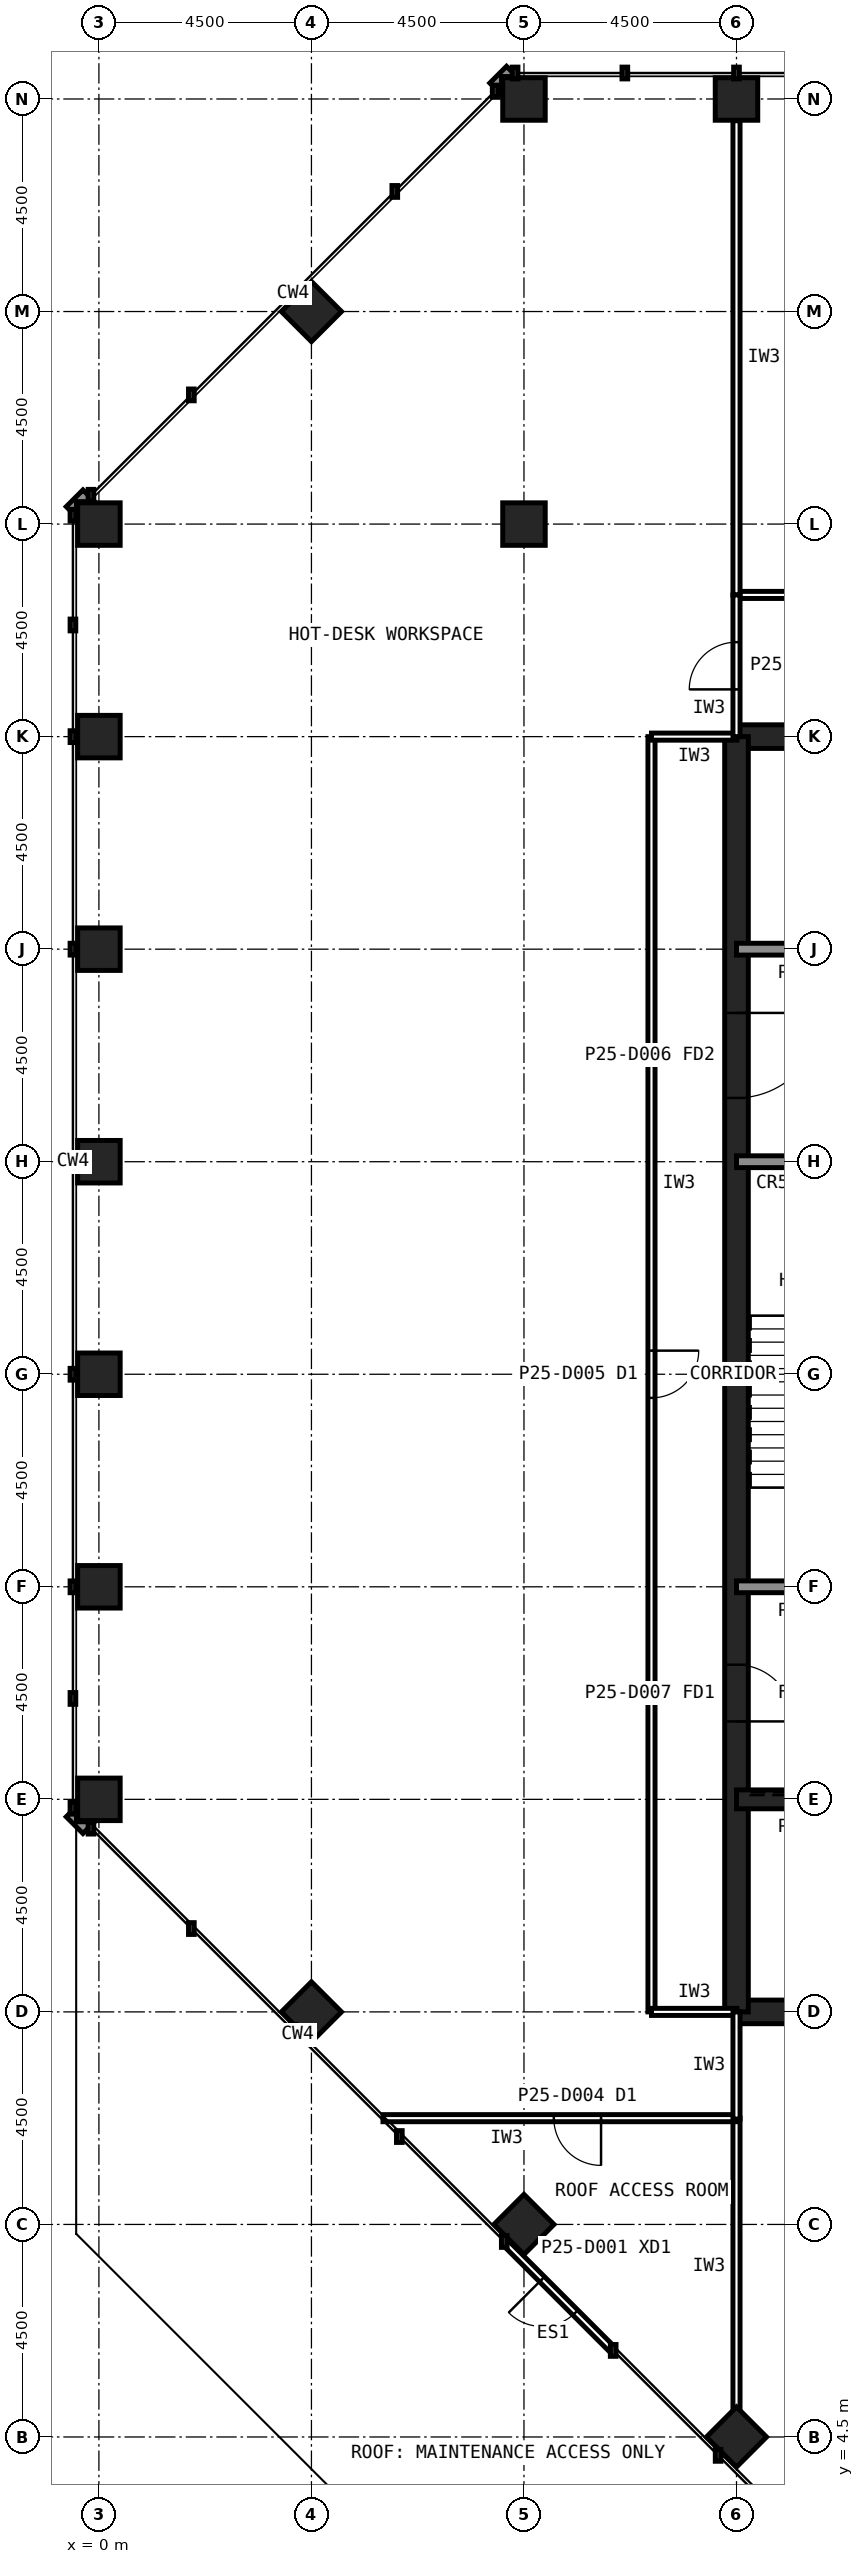
"""IFC4 building model, lengths in metres.
Left out: names, types, materials, properties, quantities, classifications, styles, units other than length and angle.
Written with IfcOpenShell. Run it as: python <this file> out.ifc"""

import sys

from ifc_helpers import new_model, si_unit, direction, frame, frame_2d, origin, origin_2d, place, context, subcontext, project, spatial, rectangle, hollow_rectangle, extrude, element, fill, save


model = new_model("IFC4")
c1 = context("Model", 3, precision=1e-05, world=origin(), true_north=direction((0.0, 1.0)))
c2 = subcontext(c1, "Body", "Model", "MODEL_VIEW")
j1 = project(units=[si_unit("LENGTHUNIT", "METRE"), si_unit("PLANEANGLEUNIT", "RADIAN")], contexts=[c1])
p1 = place(None, origin())
s1 = spatial("IfcSite", under=j1, at=p1, CompositionType="ELEMENT")
p2 = place(p1, origin())
s2 = spatial("IfcBuilding", under=s1, at=p2, CompositionType="ELEMENT")
p3 = place(p2, frame((0.0, 0.0, 110.6)))
s3 = spatial("IfcBuildingStorey", under=s2, at=p3, CompositionType="ELEMENT", Elevation=110.6)
for number, where, z_axis, x_axis in (
    (1, (13.5, 54.0, 0.0), (0.0, 0.0, 1.0), (1.0, 0.0, 0.0)),
    (2, (9.0, 54.0, 0.0), (0.0, 0.0, 1.0), (1.0, 0.0, 0.0)),
    (3, (0.0, 45.0, 0.0), (0.0, 0.0, 1.0), (1.0, 0.0, 0.0)),
    (4, (0.0, 40.5, 0.0), (0.0, 0.0, 1.0), (1.0, 0.0, 0.0)),
    (5, (0.0, 36.0, 0.0), (0.0, 0.0, 1.0), (1.0, 0.0, 0.0)),
    (6, (0.0, 31.5, 0.0), (0.0, 0.0, 1.0), (1.0, 0.0, 0.0)),
    (7, (0.0, 27.0, 0.0), (0.0, 0.0, 1.0), (1.0, 0.0, 0.0)),
    (8, (0.0, 22.5, 0.0), (0.0, 0.0, 1.0), (1.0, 0.0, 0.0)),
    (9, (0.0, 18.0, 0.0), (0.0, 0.0, 1.0), (1.0, 0.0, 0.0)),
    (10, (13.5, 4.5, 0.0), (0.0, 0.0, 1.0), (0.707, 0.707, 0.0)),
    (11, (9.0, 9.0, 0.0), (0.0, 0.0, 1.0), (0.707, 0.707, 0.0)),
    (12, (4.5, 13.5, 0.0), (0.0, 0.0, 1.0), (0.707, 0.707, 0.0)),
    (13, (4.5, 49.5, 0.0), (0.0, 0.0, 1.0), (0.707, 0.707, 0.0)),
    (14, (9.0, 45.0, 0.0), (0.0, 0.0, 1.0), (1.0, 0.0, 0.0)),
):
    element("IfcColumn", number, at=place(p3, frame(where, z_axis=z_axis, x_axis=x_axis)), inside=s3, PredefinedType="COLUMN", context=c2, shape_type="SweptSolid", body=[
        extrude(hollow_rectangle(XDim=0.9, YDim=0.9, WallThickness=0.063, at=origin_2d()), origin(), (0.0, 0.0, 1.0), 5.0),
    ])
for number, where, z_axis, x_axis in (
    (15, (13.5, 13.5, 0.0), (0.0, 0.0, 1.0), (1.0, 0.0, 0.0)),
    (16, (40.5, 40.5, 0.0), (0.0, 0.0, 1.0), (-1.0, 0.0, 0.0)),
):
    element("IfcWall", number, at=place(p3, frame(where, z_axis=z_axis, x_axis=x_axis)), inside=s3, PredefinedType="SHEAR", context=c2, shape_type="SweptSolid", body=[
        extrude(rectangle(XDim=27.0, YDim=0.5, at=frame_2d((13.5, 0.0))), origin(), (0.0, 0.0, 1.0), 5.0),
    ])
p4 = place(p3, frame((13.5, 40.5, 0.0), z_axis=(0.0, 0.0, 1.0), x_axis=(0.0, -1.0, 0.0)))
e17 = element("IfcWall", 17, at=p4, inside=s3, PredefinedType="SHEAR", context=c2, shape_type="SweptSolid", body=[
    extrude(rectangle(XDim=27.0, YDim=0.5, at=frame_2d((13.5, 0.0))), origin(), (0.0, 0.0, 1.0), 5.0),
])
p5 = place(p4, frame((19.65, 0.0, 0.0)))
e18 = element("IfcOpeningElement", 18, at=p5, cuts=e17, PredefinedType="OPENING", context=c2, shape_type="SweptSolid", body=[
    extrude(rectangle(XDim=1.2, YDim=2.1, at=frame_2d((0.6, 1.05))), frame((0.0, 0.26, 0.0), z_axis=(0.0, -1.0, 0.0), x_axis=(1.0, 0.0, 0.0)), (0.0, 0.0, 1.0), 0.52),
])
p6 = place(p4, frame((5.85, 0.0, 0.0)))
e19 = element("IfcOpeningElement", 19, at=p6, cuts=e17, PredefinedType="OPENING", context=c2, shape_type="SweptSolid", body=[
    extrude(rectangle(XDim=1.8, YDim=2.1, at=frame_2d((0.9, 1.05))), frame((0.0, 0.26, 0.0), z_axis=(0.0, -1.0, 0.0), x_axis=(1.0, 0.0, 0.0)), (0.0, 0.0, 1.0), 0.52),
])
p7 = place(p3, frame((13.5, 18.0, 0.0), z_axis=(0.0, 0.0, 1.0), x_axis=(1.0, 0.0, 0.0)))
e20 = element("IfcWall", 20, at=p7, inside=s3, PredefinedType="SHEAR", context=c2, shape_type="SweptSolid", body=[
    extrude(rectangle(XDim=27.0, YDim=0.4, at=frame_2d((13.5, 0.0))), origin(), (0.0, 0.0, 1.0), 5.0),
])
p8 = place(p7, frame((24.3, 0.0, 0.0)))
e21 = element("IfcOpeningElement", 21, at=p8, cuts=e20, PredefinedType="OPENING", context=c2, shape_type="SweptSolid", body=[
    extrude(rectangle(XDim=0.9, YDim=2.1, at=frame_2d((0.45, 1.05))), frame((0.0, 0.21, 0.0), z_axis=(0.0, -1.0, 0.0), x_axis=(1.0, 0.0, 0.0)), (0.0, 0.0, 1.0), 0.42),
])
p9 = place(p7, frame((5.45, 0.0, 0.0)))
e22 = element("IfcOpeningElement", 22, at=p9, cuts=e20, PredefinedType="OPENING", context=c2, shape_type="SweptSolid", body=[
    extrude(rectangle(XDim=1.1, YDim=2.1, at=frame_2d((0.55, 1.05))), frame((0.0, 0.21, 0.0), z_axis=(0.0, -1.0, 0.0), x_axis=(1.0, 0.0, 0.0)), (0.0, 0.0, 1.0), 0.42),
])
p10 = place(p7, frame((8.45, 0.0, 0.0)))
e23 = element("IfcOpeningElement", 23, at=p10, cuts=e20, PredefinedType="OPENING", context=c2, shape_type="SweptSolid", body=[
    extrude(rectangle(XDim=1.1, YDim=2.1, at=frame_2d((0.55, 1.05))), frame((0.0, 0.21, 0.0), z_axis=(0.0, -1.0, 0.0), x_axis=(1.0, 0.0, 0.0)), (0.0, 0.0, 1.0), 0.42),
])
p11 = place(p7, frame((11.45, 0.0, 0.0)))
e24 = element("IfcOpeningElement", 24, at=p11, cuts=e20, PredefinedType="OPENING", context=c2, shape_type="SweptSolid", body=[
    extrude(rectangle(XDim=1.1, YDim=2.1, at=frame_2d((0.55, 1.05))), frame((0.0, 0.21, 0.0), z_axis=(0.0, -1.0, 0.0), x_axis=(1.0, 0.0, 0.0)), (0.0, 0.0, 1.0), 0.42),
])
p12 = place(p7, frame((14.45, 0.0, 0.0)))
e25 = element("IfcOpeningElement", 25, at=p12, cuts=e20, PredefinedType="OPENING", context=c2, shape_type="SweptSolid", body=[
    extrude(rectangle(XDim=1.1, YDim=2.1, at=frame_2d((0.55, 1.05))), frame((0.0, 0.21, 0.0), z_axis=(0.0, -1.0, 0.0), x_axis=(1.0, 0.0, 0.0)), (0.0, 0.0, 1.0), 0.42),
])
p13 = place(p7, frame((17.45, 0.0, 0.0)))
e26 = element("IfcOpeningElement", 26, at=p13, cuts=e20, PredefinedType="OPENING", context=c2, shape_type="SweptSolid", body=[
    extrude(rectangle(XDim=1.1, YDim=2.1, at=frame_2d((0.55, 1.05))), frame((0.0, 0.21, 0.0), z_axis=(0.0, -1.0, 0.0), x_axis=(1.0, 0.0, 0.0)), (0.0, 0.0, 1.0), 0.42),
])
p14 = place(p7, frame((20.45, 0.0, 0.0)))
e27 = element("IfcOpeningElement", 27, at=p14, cuts=e20, PredefinedType="OPENING", context=c2, shape_type="SweptSolid", body=[
    extrude(rectangle(XDim=1.1, YDim=2.1, at=frame_2d((0.55, 1.05))), frame((0.0, 0.21, 0.0), z_axis=(0.0, -1.0, 0.0), x_axis=(1.0, 0.0, 0.0)), (0.0, 0.0, 1.0), 0.42),
])
p15 = place(p7, frame((1.6, 0.0, 0.0)))
e28 = element("IfcOpeningElement", 28, at=p15, cuts=e20, PredefinedType="OPENING", context=c2, shape_type="SweptSolid", body=[
    extrude(rectangle(XDim=1.3, YDim=2.2, at=frame_2d((0.65, 1.1))), frame((0.0, 0.21, 0.0), z_axis=(0.0, -1.0, 0.0), x_axis=(1.0, 0.0, 0.0)), (0.0, 0.0, 1.0), 0.42),
])
p16 = place(p3, frame((13.5, 36.0, 0.0), z_axis=(0.0, 0.0, 1.0), x_axis=(1.0, 0.0, 0.0)))
e29 = element("IfcWall", 29, at=p16, inside=s3, PredefinedType="SOLIDWALL", context=c2, shape_type="SweptSolid", body=[
    extrude(rectangle(XDim=27.0, YDim=0.25, at=frame_2d((13.5, 0.0))), origin(), (0.0, 0.0, 1.0), 4.84),
])
p17 = place(p16, frame((1.8, 0.0, 0.0)))
e30 = element("IfcOpeningElement", 30, at=p17, cuts=e29, PredefinedType="OPENING", context=c2, shape_type="SweptSolid", body=[
    extrude(rectangle(XDim=0.9, YDim=2.1, at=frame_2d((0.45, 1.05))), frame((0.0, 0.135, 0.0), z_axis=(0.0, -1.0, 0.0), x_axis=(1.0, 0.0, 0.0)), (0.0, 0.0, 1.0), 0.27),
])
p18 = place(p16, frame((5.35, 0.0, 0.0)))
e31 = element("IfcOpeningElement", 31, at=p18, cuts=e29, PredefinedType="OPENING", context=c2, shape_type="SweptSolid", body=[
    extrude(rectangle(XDim=1.3, YDim=2.2, at=frame_2d((0.65, 1.1))), frame((0.0, 0.135, 0.0), z_axis=(0.0, -1.0, 0.0), x_axis=(1.0, 0.0, 0.0)), (0.0, 0.0, 1.0), 0.27),
])
p19 = place(p16, frame((8.35, 0.0, 0.0)))
e32 = element("IfcOpeningElement", 32, at=p19, cuts=e29, PredefinedType="OPENING", context=c2, shape_type="SweptSolid", body=[
    extrude(rectangle(XDim=1.3, YDim=2.2, at=frame_2d((0.65, 1.1))), frame((0.0, 0.135, 0.0), z_axis=(0.0, -1.0, 0.0), x_axis=(1.0, 0.0, 0.0)), (0.0, 0.0, 1.0), 0.27),
])
p20 = place(p16, frame((11.35, 0.0, 0.0)))
e33 = element("IfcOpeningElement", 33, at=p20, cuts=e29, PredefinedType="OPENING", context=c2, shape_type="SweptSolid", body=[
    extrude(rectangle(XDim=1.3, YDim=2.2, at=frame_2d((0.65, 1.1))), frame((0.0, 0.135, 0.0), z_axis=(0.0, -1.0, 0.0), x_axis=(1.0, 0.0, 0.0)), (0.0, 0.0, 1.0), 0.27),
])
p21 = place(p16, frame((24.1, 0.0, 0.0)))
e34 = element("IfcOpeningElement", 34, at=p21, cuts=e29, PredefinedType="OPENING", context=c2, shape_type="SweptSolid", body=[
    extrude(rectangle(XDim=1.3, YDim=2.2, at=frame_2d((0.65, 1.1))), frame((0.0, 0.135, 0.0), z_axis=(0.0, -1.0, 0.0), x_axis=(1.0, 0.0, 0.0)), (0.0, 0.0, 1.0), 0.27),
])
p22 = place(p3, frame((13.5, 22.5, 0.0), z_axis=(0.0, 0.0, 1.0), x_axis=(1.0, 0.0, 0.0)))
e35 = element("IfcWall", 35, at=p22, inside=s3, PredefinedType="SOLIDWALL", context=c2, shape_type="SweptSolid", body=[
    extrude(rectangle(XDim=27.0, YDim=0.25, at=frame_2d((13.5, 0.0))), origin(), (0.0, 0.0, 1.0), 4.84),
])
p23 = place(p22, frame((1.65, 0.0, 0.0)))
e36 = element("IfcOpeningElement", 36, at=p23, cuts=e35, PredefinedType="OPENING", context=c2, shape_type="SweptSolid", body=[
    extrude(rectangle(XDim=1.2, YDim=2.1, at=frame_2d((0.6, 1.05))), frame((0.0, 0.135, 0.0), z_axis=(0.0, -1.0, 0.0), x_axis=(1.0, 0.0, 0.0)), (0.0, 0.0, 1.0), 0.27),
])
p24 = place(p22, frame((6.025, 0.0, 0.0)))
e37 = element("IfcOpeningElement", 37, at=p24, cuts=e35, PredefinedType="OPENING", context=c2, shape_type="SweptSolid", body=[
    extrude(rectangle(XDim=1.0, YDim=2.1, at=frame_2d((0.5, 1.05))), frame((0.0, 0.135, 0.0), z_axis=(0.0, -1.0, 0.0), x_axis=(1.0, 0.0, 0.0)), (0.0, 0.0, 1.0), 0.27),
])
p25 = place(p22, frame((10.525, 0.0, 0.0)))
e38 = element("IfcOpeningElement", 38, at=p25, cuts=e35, PredefinedType="OPENING", context=c2, shape_type="SweptSolid", body=[
    extrude(rectangle(XDim=1.0, YDim=2.1, at=frame_2d((0.5, 1.05))), frame((0.0, 0.135, 0.0), z_axis=(0.0, -1.0, 0.0), x_axis=(1.0, 0.0, 0.0)), (0.0, 0.0, 1.0), 0.27),
])
p26 = place(p22, frame((19.75, 0.0, 0.0)))
e39 = element("IfcOpeningElement", 39, at=p26, cuts=e35, PredefinedType="OPENING", context=c2, shape_type="SweptSolid", body=[
    extrude(rectangle(XDim=1.0, YDim=2.1, at=frame_2d((0.5, 1.05))), frame((0.0, 0.135, 0.0), z_axis=(0.0, -1.0, 0.0), x_axis=(1.0, 0.0, 0.0)), (0.0, 0.0, 1.0), 0.27),
])
p27 = place(p22, frame((15.05, 0.0, 0.0)))
e40 = element("IfcOpeningElement", 40, at=p27, cuts=e35, PredefinedType="OPENING", context=c2, shape_type="SweptSolid", body=[
    extrude(rectangle(XDim=1.4, YDim=2.4, at=frame_2d((0.7, 1.2))), frame((0.0, 0.135, 0.0), z_axis=(0.0, -1.0, 0.0), x_axis=(1.0, 0.0, 0.0)), (0.0, 0.0, 1.0), 0.27),
])
p28 = place(p3, frame((13.5, 31.5, 0.0), z_axis=(0.0, 0.0, 1.0), x_axis=(1.0, 0.0, 0.0)))
e41 = element("IfcWall", 41, at=p28, inside=s3, PredefinedType="SOLIDWALL", context=c2, shape_type="SweptSolid", body=[
    extrude(rectangle(XDim=27.0, YDim=0.25, at=frame_2d((13.5, 0.0))), origin(), (0.0, 0.0, 1.0), 4.84),
])
p29 = place(p28, frame((24.15, 0.0, 0.0)))
e42 = element("IfcOpeningElement", 42, at=p29, cuts=e41, PredefinedType="OPENING", context=c2, shape_type="SweptSolid", body=[
    extrude(rectangle(XDim=1.2, YDim=2.1, at=frame_2d((0.6, 1.05))), frame((0.0, 0.135, 0.0), z_axis=(0.0, -1.0, 0.0), x_axis=(1.0, 0.0, 0.0)), (0.0, 0.0, 1.0), 0.27),
])
p30 = place(p28, frame((15.3, 0.0, 0.0)))
e43 = element("IfcOpeningElement", 43, at=p30, cuts=e41, PredefinedType="OPENING", context=c2, shape_type="SweptSolid", body=[
    extrude(rectangle(XDim=0.9, YDim=2.1, at=frame_2d((0.45, 1.05))), frame((0.0, 0.135, 0.0), z_axis=(0.0, -1.0, 0.0), x_axis=(1.0, 0.0, 0.0)), (0.0, 0.0, 1.0), 0.27),
])
p31 = place(p28, frame((19.8, 0.0, 0.0)))
e44 = element("IfcOpeningElement", 44, at=p31, cuts=e41, PredefinedType="OPENING", context=c2, shape_type="SweptSolid", body=[
    extrude(rectangle(XDim=0.9, YDim=2.1, at=frame_2d((0.45, 1.05))), frame((0.0, 0.135, 0.0), z_axis=(0.0, -1.0, 0.0), x_axis=(1.0, 0.0, 0.0)), (0.0, 0.0, 1.0), 0.27),
])
p32 = place(p3, frame((10.861, 6.361, 0.0), z_axis=(0.0, 0.0, 1.0), x_axis=(-0.707106781187, 0.707106781187, 0.0)))
e45 = element("IfcWall", 45, at=p32, inside=s3, PredefinedType="USERDEFINED", context=c2, shape_type="SweptSolid", body=[
    extrude(rectangle(XDim=3.182, YDim=0.15, at=frame_2d((1.591, 0.0))), origin(), (0.0, 0.0, 1.0), 5.0),
])
p33 = place(p32, frame((1.091, 0.0, 0.0)))
e46 = element("IfcOpeningElement", 46, at=p33, cuts=e45, PredefinedType="OPENING", context=c2, shape_type="SweptSolid", body=[
    extrude(rectangle(XDim=1.0, YDim=2.1, at=frame_2d((0.5, 1.05))), frame((0.0, 0.085, 0.0), z_axis=(0.0, -1.0, 0.0), x_axis=(1.0, 0.0, 0.0)), (0.0, 0.0, 1.0), 0.17),
])
p34 = place(p3, frame((11.7, 40.5, 0.0), z_axis=(0.0, 0.0, 1.0), x_axis=(0.0, -1.0, 0.0)))
e47 = element("IfcWall", 47, at=p34, inside=s3, PredefinedType="PARTITIONING", context=c2, shape_type="SweptSolid", body=[
    extrude(rectangle(XDim=27.0, YDim=0.15, at=frame_2d((13.5, 0.0))), origin(), (0.0, 0.0, 1.0), 4.84),
])
p35 = place(p34, frame((13.0, 0.0, 0.0)))
e48 = element("IfcOpeningElement", 48, at=p35, cuts=e47, PredefinedType="OPENING", context=c2, shape_type="SweptSolid", body=[
    extrude(rectangle(XDim=1.0, YDim=2.1, at=frame_2d((0.5, 1.05))), frame((0.0, 0.085, 0.0), z_axis=(0.0, -1.0, 0.0), x_axis=(1.0, 0.0, 0.0)), (0.0, 0.0, 1.0), 0.17),
])
for number, where, z_axis, x_axis in (
    (49, (11.7, 13.5, 0.0), (0.0, 0.0, 1.0), (1.0, 0.0, 0.0)),
    (50, (13.51, 40.5, 0.0), (0.0, 0.0, 1.0), (-1.0, 0.0, 0.0)),
):
    element("IfcWall", number, at=place(p3, frame(where, z_axis=z_axis, x_axis=x_axis)), inside=s3, PredefinedType="PARTITIONING", context=c2, shape_type="SweptSolid", body=[
        extrude(rectangle(XDim=1.81, YDim=0.15, at=frame_2d((0.905, 0.0))), origin(), (0.0, 0.0, 1.0), 3.989),
    ])
p36 = place(p3, frame((13.5, 43.5, 0.0), z_axis=(0.0, 0.0, 1.0), x_axis=(1.0, 0.0, 0.0)))
e51 = element("IfcWall", 51, at=p36, inside=s3, PredefinedType="PARTITIONING", context=c2, shape_type="SweptSolid", body=[
    extrude(rectangle(XDim=18.0, YDim=0.15, at=frame_2d((9.0, 0.0))), origin(), (0.0, 0.0, 1.0), 4.84),
])
p37 = place(p36, frame((8.5, 0.0, 0.0)))
e52 = element("IfcOpeningElement", 52, at=p37, cuts=e51, PredefinedType="OPENING", context=c2, shape_type="SweptSolid", body=[
    extrude(rectangle(XDim=1.0, YDim=2.1, at=frame_2d((0.5, 1.05))), frame((0.0, 0.085, 0.0), z_axis=(0.0, -1.0, 0.0), x_axis=(1.0, 0.0, 0.0)), (0.0, 0.0, 1.0), 0.17),
])
p38 = place(p3, frame((13.5, 53.54, 0.0), z_axis=(0.0, 0.0, 1.0), x_axis=(0.0, -1.0, 0.0)))
e53 = element("IfcWall", 53, at=p38, inside=s3, PredefinedType="PARTITIONING", context=c2, shape_type="SweptSolid", body=[
    extrude(rectangle(XDim=10.04, YDim=0.15, at=frame_2d((5.02, 0.0))), origin(), (0.0, 0.0, 1.0), 3.989),
])
p39 = place(p3, frame((13.5, 4.96, 0.0), z_axis=(0.0, 0.0, 1.0), x_axis=(0.0, 1.0, 0.0)))
e54 = element("IfcWall", 54, at=p39, inside=s3, PredefinedType="PARTITIONING", context=c2, shape_type="SweptSolid", body=[
    extrude(rectangle(XDim=6.29, YDim=0.15, at=frame_2d((3.145, 0.0))), origin(), (0.0, 0.0, 1.0), 3.989),
])
p40 = place(p3, frame((13.5, 11.25, 0.0), z_axis=(0.0, 0.0, 1.0), x_axis=(-1.0, 0.0, 0.0)))
e55 = element("IfcWall", 55, at=p40, inside=s3, PredefinedType="PARTITIONING", context=c2, shape_type="SweptSolid", body=[
    extrude(rectangle(XDim=7.485, YDim=0.15, at=frame_2d((3.743, 0.0))), origin(), (0.0, 0.0, 1.0), 4.84),
])
p41 = place(p40, frame((2.868, 0.0, 0.0)))
e56 = element("IfcOpeningElement", 56, at=p41, cuts=e55, PredefinedType="OPENING", context=c2, shape_type="SweptSolid", body=[
    extrude(rectangle(XDim=1.0, YDim=2.1, at=frame_2d((0.5, 1.05))), frame((0.0, 0.085, 0.0), z_axis=(0.0, -1.0, 0.0), x_axis=(1.0, 0.0, 0.0)), (0.0, 0.0, 1.0), 0.17),
])
p42 = place(p3, frame((13.5, 40.5, 0.0), z_axis=(0.0, 0.0, 1.0), x_axis=(0.0, 1.0, 0.0)))
e57 = element("IfcWall", 57, at=p42, inside=s3, PredefinedType="PARTITIONING", context=c2, shape_type="SweptSolid", body=[
    extrude(rectangle(XDim=3.0, YDim=0.15, at=frame_2d((1.5, 0.0))), origin(), (0.0, 0.0, 1.0), 3.989),
])
p43 = place(p42, frame((1.0, 0.0, 0.0)))
e58 = element("IfcOpeningElement", 58, at=p43, cuts=e57, PredefinedType="OPENING", context=c2, shape_type="SweptSolid", body=[
    extrude(rectangle(XDim=1.0, YDim=2.1, at=frame_2d((0.5, 1.05))), frame((0.0, 0.085, 0.0), z_axis=(0.0, -1.0, 0.0), x_axis=(1.0, 0.0, 0.0)), (0.0, 0.0, 1.0), 0.17),
])
p44 = place(p3, frame((13.5, 11.23, 0.0), z_axis=(0.0, 0.0, 1.0), x_axis=(0.0, 1.0, 0.0)))
e59 = element("IfcWall", 59, at=p44, inside=s3, PredefinedType="PARTITIONING", context=c2, shape_type="SweptSolid", body=[
    extrude(rectangle(XDim=2.27, YDim=0.15, at=frame_2d((1.135, 0.0))), origin(), (0.0, 0.0, 1.0), 3.989),
])
p45 = place(p33, origin())
e60 = element("IfcDoor", 60, at=p45, inside=s3, OperationType="SINGLE_SWING_RIGHT", PredefinedType="DOOR", context=c2, shape_type="SweptSolid", body=[
    extrude(rectangle(XDim=1.0, YDim=2.1, at=frame_2d((0.5, 1.05))), frame((0.0, 0.025, 0.0), z_axis=(0.0, -1.0, 0.0), x_axis=(1.0, 0.0, 0.0)), (0.0, 0.0, 1.0), 0.05),
])
fill(e46, e60)
p46 = place(p5, origin())
e61 = element("IfcDoor", 61, at=p46, inside=s3, OperationType="SINGLE_SWING_RIGHT", PredefinedType="DOOR", context=c2, shape_type="SweptSolid", body=[
    extrude(rectangle(XDim=1.2, YDim=2.1, at=frame_2d((0.6, 1.05))), frame((0.0, 0.025, 0.0), z_axis=(0.0, -1.0, 0.0), x_axis=(1.0, 0.0, 0.0)), (0.0, 0.0, 1.0), 0.05),
])
fill(e18, e61)
p47 = place(p6, origin())
e62 = element("IfcDoor", 62, at=p47, inside=s3, OperationType="SINGLE_SWING_LEFT", PredefinedType="DOOR", context=c2, shape_type="SweptSolid", body=[
    extrude(rectangle(XDim=1.8, YDim=2.1, at=frame_2d((0.9, 1.05))), frame((0.0, 0.025, 0.0), z_axis=(0.0, -1.0, 0.0), x_axis=(1.0, 0.0, 0.0)), (0.0, 0.0, 1.0), 0.05),
])
fill(e19, e62)
p48 = place(p35, origin())
e63 = element("IfcDoor", 63, at=p48, inside=s3, OperationType="SINGLE_SWING_LEFT", PredefinedType="DOOR", context=c2, shape_type="SweptSolid", body=[
    extrude(rectangle(XDim=1.0, YDim=2.1, at=frame_2d((0.5, 1.05))), frame((0.0, 0.025, 0.0), z_axis=(0.0, -1.0, 0.0), x_axis=(1.0, 0.0, 0.0)), (0.0, 0.0, 1.0), 0.05),
])
fill(e48, e63)
p49 = place(p41, origin())
e64 = element("IfcDoor", 64, at=p49, inside=s3, OperationType="SINGLE_SWING_LEFT", PredefinedType="DOOR", context=c2, shape_type="SweptSolid", body=[
    extrude(rectangle(XDim=1.0, YDim=2.1, at=frame_2d((0.5, 1.05))), frame((0.0, 0.025, 0.0), z_axis=(0.0, -1.0, 0.0), x_axis=(1.0, 0.0, 0.0)), (0.0, 0.0, 1.0), 0.05),
])
fill(e56, e64)
p50 = place(p43, origin())
e65 = element("IfcDoor", 65, at=p50, inside=s3, OperationType="SINGLE_SWING_LEFT", PredefinedType="DOOR", context=c2, shape_type="SweptSolid", body=[
    extrude(rectangle(XDim=1.0, YDim=2.1, at=frame_2d((0.5, 1.05))), frame((0.0, 0.025, 0.0), z_axis=(0.0, -1.0, 0.0), x_axis=(1.0, 0.0, 0.0)), (0.0, 0.0, 1.0), 0.05),
])
fill(e58, e65)
save(model, sys.argv[1])
